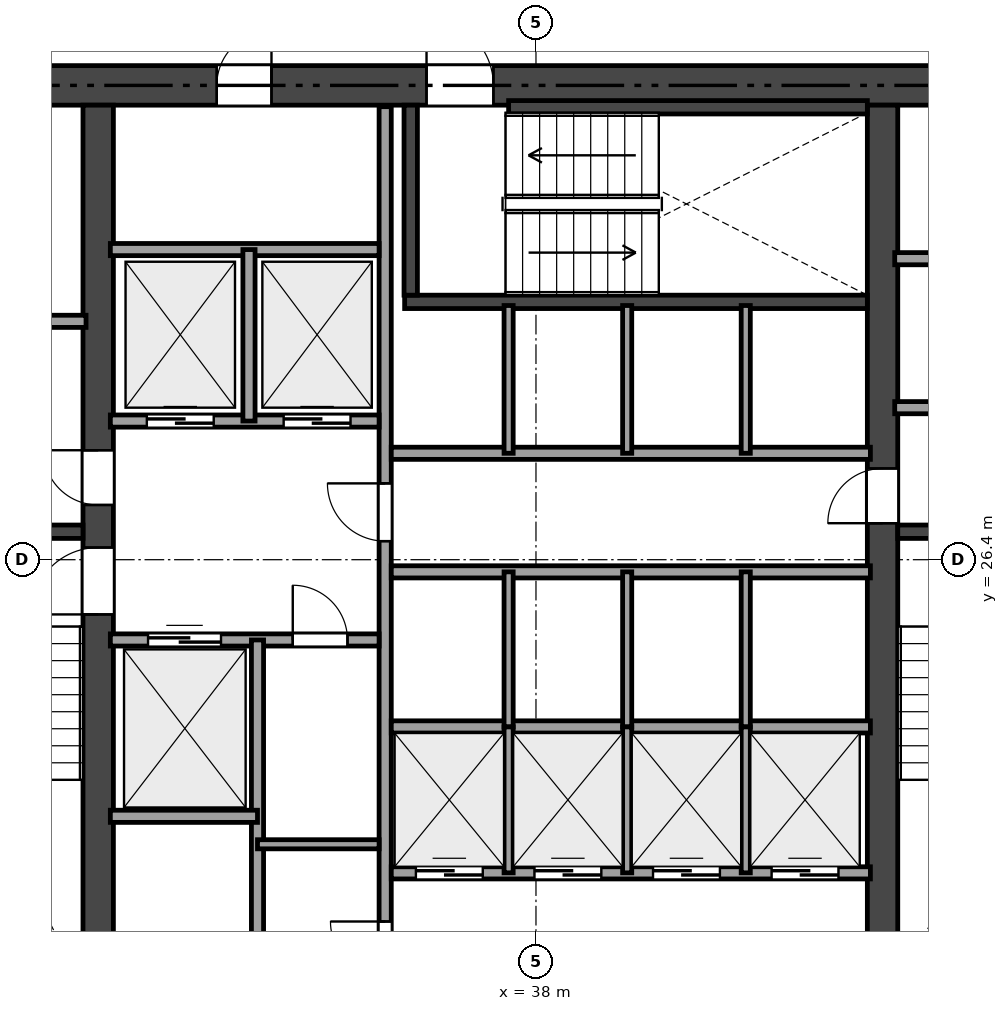
"""IFC4 building model, lengths in metres.
Left out: names, types, materials, properties, quantities, classifications, styles, units other than length and angle.
Written with IfcOpenShell. Run it as: python <this file> out.ifc"""

import sys

from ifc_helpers import new_model, si_unit, direction, frame, frame_2d, origin, place, context, subcontext, project, spatial, rectangle, extrude, element, fill, save


model = new_model("IFC4")
c1 = context("Model", 3, precision=1e-05, world=origin(), true_north=direction((0.0, 1.0)))
c2 = subcontext(c1, "Body", "Model", "MODEL_VIEW")
j1 = project(units=[si_unit("LENGTHUNIT", "METRE"), si_unit("PLANEANGLEUNIT", "RADIAN")], contexts=[c1])
p1 = place(None, origin())
s1 = spatial("IfcSite", under=j1, at=p1, CompositionType="ELEMENT")
p2 = place(p1, origin())
s2 = spatial("IfcBuilding", under=s1, at=p2, CompositionType="ELEMENT")
p3 = place(p2, frame((0.0, 0.0, 37.35)))
s3 = spatial("IfcBuildingStorey", under=s2, at=p3, CompositionType="ELEMENT", Elevation=37.35)
p4 = place(p3, frame((26.475, 34.2, 0.0), z_axis=(0.0, 0.0, 1.0), x_axis=(1.0, 0.0, 0.0)))
e1 = element("IfcWall", 1, at=p4, inside=s3, PredefinedType="SHEAR", context=c2, shape_type="SweptSolid", body=[
    extrude(rectangle(XDim=21.45, YDim=0.65, at=frame_2d((10.725, 0.0))), origin(), (0.0, 0.0, 1.0), 3.17),
])
p5 = place(p4, frame((9.725, 0.0, 0.0)))
e2 = element("IfcOpeningElement", 2, at=p5, cuts=e1, PredefinedType="OPENING", context=c2, shape_type="SweptSolid", body=[
    extrude(rectangle(XDim=1.1, YDim=2.15, at=frame_2d((0.55, 1.075))), frame((0.0, 0.335, 0.0), z_axis=(0.0, -1.0, 0.0), x_axis=(1.0, 0.0, 0.0)), (0.0, 0.0, 1.0), 0.67),
])
p6 = place(p4, frame((1.975, 0.0, 0.0)))
e3 = element("IfcOpeningElement", 3, at=p6, cuts=e1, PredefinedType="OPENING", context=c2, shape_type="SweptSolid", body=[
    extrude(rectangle(XDim=0.9, YDim=2.1, at=frame_2d((0.45, 1.05))), frame((0.0, 0.335, 0.0), z_axis=(0.0, -1.0, 0.0), x_axis=(1.0, 0.0, 0.0)), (0.0, 0.0, 1.0), 0.67),
])
p7 = place(p4, frame((6.275, 0.0, 0.0)))
e4 = element("IfcOpeningElement", 4, at=p7, cuts=e1, PredefinedType="OPENING", context=c2, shape_type="SweptSolid", body=[
    extrude(rectangle(XDim=0.9, YDim=2.1, at=frame_2d((0.45, 1.05))), frame((0.0, 0.335, 0.0), z_axis=(0.0, -1.0, 0.0), x_axis=(1.0, 0.0, 0.0)), (0.0, 0.0, 1.0), 0.67),
])
p8 = place(p3, frame((30.8, 18.925, 0.0), z_axis=(0.0, 0.0, 1.0), x_axis=(0.0, 1.0, 0.0)))
e5 = element("IfcWall", 5, at=p8, inside=s3, PredefinedType="SHEAR", context=c2, shape_type="SweptSolid", body=[
    extrude(rectangle(XDim=14.95, YDim=0.5, at=frame_2d((7.475, 0.0))), origin(), (0.0, 0.0, 1.0), 3.17),
])
p9 = place(p8, frame((6.575, 0.0, 0.0)))
e6 = element("IfcOpeningElement", 6, at=p9, cuts=e5, PredefinedType="OPENING", context=c2, shape_type="SweptSolid", body=[
    extrude(rectangle(XDim=1.1, YDim=2.15, at=frame_2d((0.55, 1.075))), frame((0.0, 0.26, 0.0), z_axis=(0.0, -1.0, 0.0), x_axis=(1.0, 0.0, 0.0)), (0.0, 0.0, 1.0), 0.52),
])
p10 = place(p8, frame((8.375, 0.0, 0.0)))
e7 = element("IfcOpeningElement", 7, at=p10, cuts=e5, PredefinedType="OPENING", context=c2, shape_type="SweptSolid", body=[
    extrude(rectangle(XDim=0.9, YDim=2.1, at=frame_2d((0.45, 1.05))), frame((0.0, 0.26, 0.0), z_axis=(0.0, -1.0, 0.0), x_axis=(1.0, 0.0, 0.0)), (0.0, 0.0, 1.0), 0.52),
])
p11 = place(p3, frame((43.7, 18.925, 0.0), z_axis=(0.0, 0.0, 1.0), x_axis=(0.0, 1.0, 0.0)))
e8 = element("IfcWall", 8, at=p11, inside=s3, PredefinedType="SHEAR", context=c2, shape_type="SweptSolid", body=[
    extrude(rectangle(XDim=14.95, YDim=0.5, at=frame_2d((7.475, 0.0))), origin(), (0.0, 0.0, 1.0), 3.17),
])
p12 = place(p11, frame((8.075, 0.0, 0.0)))
e9 = element("IfcOpeningElement", 9, at=p12, cuts=e8, PredefinedType="OPENING", context=c2, shape_type="SweptSolid", body=[
    extrude(rectangle(XDim=0.9, YDim=2.1, at=frame_2d((0.45, 1.05))), frame((0.0, 0.26, 0.0), z_axis=(0.0, -1.0, 0.0), x_axis=(1.0, 0.0, 0.0)), (0.0, 0.0, 1.0), 0.52),
])
p13 = place(p3, frame((27.125, 26.86, 0.0), z_axis=(0.0, 0.0, 1.0), x_axis=(1.0, 0.0, 0.0)))
e10 = element("IfcWall", 10, at=p13, inside=s3, PredefinedType="SHEAR", context=c2, shape_type="SweptSolid", body=[
    extrude(rectangle(XDim=3.425, YDim=0.22, at=frame_2d((1.712, 0.0))), origin(), (0.0, 0.0, 1.0), 3.17),
])
p14 = place(p3, frame((43.95, 26.86, 0.0), z_axis=(0.0, 0.0, 1.0), x_axis=(1.0, 0.0, 0.0)))
e11 = element("IfcWall", 11, at=p14, inside=s3, PredefinedType="SHEAR", context=c2, shape_type="SweptSolid", body=[
    extrude(rectangle(XDim=3.325, YDim=0.22, at=frame_2d((1.663, 0.0))), origin(), (0.0, 0.0, 1.0), 3.17),
])
p15 = place(p3, frame((35.84, 30.64, 0.0), z_axis=(0.0, 0.0, 1.0), x_axis=(1.0, 0.0, 0.0)))
e12 = element("IfcWall", 12, at=p15, inside=s3, PredefinedType="SHEAR", context=c2, shape_type="SweptSolid", body=[
    extrude(rectangle(XDim=7.61, YDim=0.22, at=frame_2d((3.805, 0.0))), origin(), (0.0, 0.0, 1.0), 3.17),
])
p16 = place(p3, frame((35.94, 30.75, 0.0), z_axis=(0.0, 0.0, 1.0), x_axis=(0.0, 1.0, 0.0)))
e13 = element("IfcWall", 13, at=p16, inside=s3, PredefinedType="SHEAR", context=c2, shape_type="SweptSolid", body=[
    extrude(rectangle(XDim=3.125, YDim=0.22, at=frame_2d((1.562, 0.0))), origin(), (0.0, 0.0, 1.0), 3.17),
])
p17 = place(p3, frame((37.55, 33.84, 0.0), z_axis=(0.0, 0.0, 1.0), x_axis=(1.0, 0.0, 0.0)))
e14 = element("IfcWall", 14, at=p17, inside=s3, PredefinedType="SHEAR", context=c2, shape_type="SweptSolid", body=[
    extrude(rectangle(XDim=5.9, YDim=0.22, at=frame_2d((2.95, 0.0))), origin(), (0.0, 0.0, 1.0), 3.17),
])
p18 = place(p3, frame((27.15, 30.32, 0.0), z_axis=(0.0, 0.0, 1.0), x_axis=(1.0, 0.0, 0.0)))
e15 = element("IfcWall", 15, at=p18, inside=s3, PredefinedType="SOLIDWALL", context=c2, shape_type="SweptSolid", body=[
    extrude(rectangle(XDim=3.45, YDim=0.2, at=frame_2d((1.725, 0.0))), origin(), (0.0, 0.0, 1.0), 3.17),
])
p19 = place(p3, frame((43.9, 28.9, 0.0), z_axis=(0.0, 0.0, 1.0), x_axis=(1.0, 0.0, 0.0)))
e16 = element("IfcWall", 16, at=p19, inside=s3, PredefinedType="SOLIDWALL", context=c2, shape_type="SweptSolid", body=[
    extrude(rectangle(XDim=3.35, YDim=0.2, at=frame_2d((1.675, 0.0))), origin(), (0.0, 0.0, 1.0), 3.17),
])
p20 = place(p19, frame((1.15, 0.0, 0.0)))
e17 = element("IfcOpeningElement", 17, at=p20, cuts=e16, PredefinedType="OPENING", context=c2, shape_type="SweptSolid", body=[
    extrude(rectangle(XDim=0.9, YDim=2.1, at=frame_2d((0.45, 1.05))), frame((0.0, 0.11, 0.0), z_axis=(0.0, -1.0, 0.0), x_axis=(1.0, 0.0, 0.0)), (0.0, 0.0, 1.0), 0.22),
])
p21 = place(p3, frame((43.9, 31.35, 0.0), z_axis=(0.0, 0.0, 1.0), x_axis=(1.0, 0.0, 0.0)))
e18 = element("IfcWall", 18, at=p21, inside=s3, PredefinedType="SOLIDWALL", context=c2, shape_type="SweptSolid", body=[
    extrude(rectangle(XDim=3.35, YDim=0.2, at=frame_2d((1.675, 0.0))), origin(), (0.0, 0.0, 1.0), 3.17),
])
p22 = place(p3, frame((35.52, 18.95, 0.0), z_axis=(0.0, 0.0, 1.0), x_axis=(0.0, 1.0, 0.0)))
e19 = element("IfcWall", 19, at=p22, inside=s3, PredefinedType="SOLIDWALL", context=c2, shape_type="SweptSolid", body=[
    extrude(rectangle(XDim=14.9, YDim=0.2, at=frame_2d((7.45, 0.0))), origin(), (0.0, 0.0, 1.0), 2.691),
])
p23 = place(p22, frame((7.755, 0.0, 0.0)))
e20 = element("IfcOpeningElement", 20, at=p23, cuts=e19, PredefinedType="OPENING", context=c2, shape_type="SweptSolid", body=[
    extrude(rectangle(XDim=0.95, YDim=2.15, at=frame_2d((0.475, 1.075))), frame((0.0, 0.11, 0.0), z_axis=(0.0, -1.0, 0.0), x_axis=(1.0, 0.0, 0.0)), (0.0, 0.0, 1.0), 0.22),
])
p24 = place(p22, frame((0.6, 0.0, 0.0)))
e21 = element("IfcOpeningElement", 21, at=p24, cuts=e19, PredefinedType="OPENING", context=c2, shape_type="SweptSolid", body=[
    extrude(rectangle(XDim=0.9, YDim=2.1, at=frame_2d((0.45, 1.05))), frame((0.0, 0.11, 0.0), z_axis=(0.0, -1.0, 0.0), x_axis=(1.0, 0.0, 0.0)), (0.0, 0.0, 1.0), 0.22),
])
p25 = place(p3, frame((31.0, 28.68, 0.0), z_axis=(0.0, 0.0, 1.0), x_axis=(1.0, 0.0, 0.0)))
e22 = element("IfcWall", 22, at=p25, inside=s3, PredefinedType="SOLIDWALL", context=c2, shape_type="SweptSolid", body=[
    extrude(rectangle(XDim=4.42, YDim=0.2, at=frame_2d((2.21, 0.0))), origin(), (0.0, 0.0, 1.0), 3.17),
])
p26 = place(p25, frame((0.6, 0.0, 0.0)))
e23 = element("IfcOpeningElement", 23, at=p26, cuts=e22, PredefinedType="OPENING", context=c2, shape_type="SweptSolid", body=[
    extrude(rectangle(XDim=1.1, YDim=2.15, at=frame_2d((0.55, 1.075))), frame((0.0, 0.11, 0.0), z_axis=(0.0, -1.0, 0.0), x_axis=(1.0, 0.0, 0.0)), (0.0, 0.0, 1.0), 0.22),
])
p27 = place(p25, frame((2.85, 0.0, 0.0)))
e24 = element("IfcOpeningElement", 24, at=p27, cuts=e22, PredefinedType="OPENING", context=c2, shape_type="SweptSolid", body=[
    extrude(rectangle(XDim=1.1, YDim=2.15, at=frame_2d((0.55, 1.075))), frame((0.0, 0.11, 0.0), z_axis=(0.0, -1.0, 0.0), x_axis=(1.0, 0.0, 0.0)), (0.0, 0.0, 1.0), 0.22),
])
p28 = place(p3, frame((31.0, 31.5, 0.0), z_axis=(0.0, 0.0, 1.0), x_axis=(1.0, 0.0, 0.0)))
e25 = element("IfcWall", 25, at=p28, inside=s3, PredefinedType="SOLIDWALL", context=c2, shape_type="SweptSolid", body=[
    extrude(rectangle(XDim=4.42, YDim=0.2, at=frame_2d((2.21, 0.0))), origin(), (0.0, 0.0, 1.0), 3.17),
])
p29 = place(p3, frame((33.28, 28.68, 0.0), z_axis=(0.0, 0.0, 1.0), x_axis=(0.0, 1.0, 0.0)))
e26 = element("IfcWall", 26, at=p29, inside=s3, PredefinedType="SOLIDWALL", context=c2, shape_type="SweptSolid", body=[
    extrude(rectangle(XDim=2.82, YDim=0.2, at=frame_2d((1.41, 0.0))), origin(), (0.0, 0.0, 1.0), 3.17),
])
p30 = place(p3, frame((31.0, 25.08, 0.0), z_axis=(0.0, 0.0, 1.0), x_axis=(1.0, 0.0, 0.0)))
e27 = element("IfcWall", 27, at=p30, inside=s3, PredefinedType="SOLIDWALL", context=c2, shape_type="SweptSolid", body=[
    extrude(rectangle(XDim=4.42, YDim=0.2, at=frame_2d((2.21, 0.0))), origin(), (0.0, 0.0, 1.0), 3.17),
])
p31 = place(p30, frame((3.0, 0.0, 0.0)))
e28 = element("IfcOpeningElement", 28, at=p31, cuts=e27, PredefinedType="OPENING", context=c2, shape_type="SweptSolid", body=[
    extrude(rectangle(XDim=0.9, YDim=2.1, at=frame_2d((0.45, 1.05))), frame((0.0, 0.11, 0.0), z_axis=(0.0, -1.0, 0.0), x_axis=(1.0, 0.0, 0.0)), (0.0, 0.0, 1.0), 0.22),
])
p32 = place(p30, frame((0.62, 0.0, 0.0)))
e29 = element("IfcOpeningElement", 29, at=p32, cuts=e27, PredefinedType="OPENING", context=c2, shape_type="SweptSolid", body=[
    extrude(rectangle(XDim=1.2, YDim=2.15, at=frame_2d((0.6, 1.075))), frame((0.0, 0.11, 0.0), z_axis=(0.0, -1.0, 0.0), x_axis=(1.0, 0.0, 0.0)), (0.0, 0.0, 1.0), 0.22),
])
p33 = place(p3, frame((33.42, 18.95, 0.0), z_axis=(0.0, 0.0, 1.0), x_axis=(0.0, 1.0, 0.0)))
e30 = element("IfcWall", 30, at=p33, inside=s3, PredefinedType="SOLIDWALL", context=c2, shape_type="SweptSolid", body=[
    extrude(rectangle(XDim=6.13, YDim=0.2, at=frame_2d((3.065, 0.0))), origin(), (0.0, 0.0, 1.0), 2.691),
])
p34 = place(p3, frame((31.0, 22.18, 0.0), z_axis=(0.0, 0.0, 1.0), x_axis=(1.0, 0.0, 0.0)))
e31 = element("IfcWall", 31, at=p34, inside=s3, PredefinedType="SOLIDWALL", context=c2, shape_type="SweptSolid", body=[
    extrude(rectangle(XDim=2.42, YDim=0.2, at=frame_2d((1.21, 0.0))), origin(), (0.0, 0.0, 1.0), 3.17),
])
p35 = place(p3, frame((33.42, 21.72, 0.0), z_axis=(0.0, 0.0, 1.0), x_axis=(1.0, 0.0, 0.0)))
e32 = element("IfcWall", 32, at=p35, inside=s3, PredefinedType="PARTITIONING", context=c2, shape_type="SweptSolid", body=[
    extrude(rectangle(XDim=2.0, YDim=0.15, at=frame_2d((1.0, 0.0))), origin(), (0.0, 0.0, 1.0), 3.17),
])
for number, where, z_axis, x_axis in (
    (33, (35.62, 28.15, 0.0), (0.0, 0.0, 1.0), (1.0, 0.0, 0.0)),
    (34, (35.62, 26.2, 0.0), (0.0, 0.0, 1.0), (1.0, 0.0, 0.0)),
):
    element("IfcWall", number, at=place(p3, frame(where, z_axis=z_axis, x_axis=x_axis)), inside=s3, PredefinedType="SOLIDWALL", context=c2, shape_type="SweptSolid", body=[
        extrude(rectangle(XDim=7.88, YDim=0.2, at=frame_2d((3.94, 0.0))), origin(), (0.0, 0.0, 1.0), 3.17),
    ])
p36 = place(p3, frame((35.62, 23.65, 0.0), z_axis=(0.0, 0.0, 1.0), x_axis=(1.0, 0.0, 0.0)))
e35 = element("IfcWall", 35, at=p36, inside=s3, PredefinedType="SOLIDWALL", context=c2, shape_type="SweptSolid", body=[
    extrude(rectangle(XDim=7.88, YDim=0.2, at=frame_2d((3.94, 0.0))), origin(), (0.0, 0.0, 1.0), 2.691),
])
p37 = place(p3, frame((35.62, 21.25, 0.0), z_axis=(0.0, 0.0, 1.0), x_axis=(1.0, 0.0, 0.0)))
e36 = element("IfcWall", 36, at=p37, inside=s3, PredefinedType="SOLIDWALL", context=c2, shape_type="SweptSolid", body=[
    extrude(rectangle(XDim=7.88, YDim=0.2, at=frame_2d((3.94, 0.0))), origin(), (0.0, 0.0, 1.0), 3.17),
])
p38 = place(p37, frame((0.405, 0.0, 0.0)))
e37 = element("IfcOpeningElement", 37, at=p38, cuts=e36, PredefinedType="OPENING", context=c2, shape_type="SweptSolid", body=[
    extrude(rectangle(XDim=1.1, YDim=2.15, at=frame_2d((0.55, 1.075))), frame((0.0, 0.11, 0.0), z_axis=(0.0, -1.0, 0.0), x_axis=(1.0, 0.0, 0.0)), (0.0, 0.0, 1.0), 0.22),
])
p39 = place(p37, frame((2.355, 0.0, 0.0)))
e38 = element("IfcOpeningElement", 38, at=p39, cuts=e36, PredefinedType="OPENING", context=c2, shape_type="SweptSolid", body=[
    extrude(rectangle(XDim=1.1, YDim=2.15, at=frame_2d((0.55, 1.075))), frame((0.0, 0.11, 0.0), z_axis=(0.0, -1.0, 0.0), x_axis=(1.0, 0.0, 0.0)), (0.0, 0.0, 1.0), 0.22),
])
p40 = place(p37, frame((4.305, 0.0, 0.0)))
e39 = element("IfcOpeningElement", 39, at=p40, cuts=e36, PredefinedType="OPENING", context=c2, shape_type="SweptSolid", body=[
    extrude(rectangle(XDim=1.1, YDim=2.15, at=frame_2d((0.55, 1.075))), frame((0.0, 0.11, 0.0), z_axis=(0.0, -1.0, 0.0), x_axis=(1.0, 0.0, 0.0)), (0.0, 0.0, 1.0), 0.22),
])
p41 = place(p37, frame((6.255, 0.0, 0.0)))
e40 = element("IfcOpeningElement", 40, at=p41, cuts=e36, PredefinedType="OPENING", context=c2, shape_type="SweptSolid", body=[
    extrude(rectangle(XDim=1.1, YDim=2.15, at=frame_2d((0.55, 1.075))), frame((0.0, 0.11, 0.0), z_axis=(0.0, -1.0, 0.0), x_axis=(1.0, 0.0, 0.0)), (0.0, 0.0, 1.0), 0.22),
])
for number, where, z_axis, x_axis in (
    (41, (37.55, 28.15, 0.0), (0.0, 0.0, 1.0), (0.0, 1.0, 0.0)),
    (42, (39.5, 28.15, 0.0), (0.0, 0.0, 1.0), (0.0, 1.0, 0.0)),
    (43, (41.45, 28.15, 0.0), (0.0, 0.0, 1.0), (0.0, 1.0, 0.0)),
):
    element("IfcWall", number, at=place(p3, frame(where, z_axis=z_axis, x_axis=x_axis)), inside=s3, PredefinedType="PARTITIONING", context=c2, shape_type="SweptSolid", body=[
        extrude(rectangle(XDim=2.43, YDim=0.15, at=frame_2d((1.215, 0.0))), origin(), (0.0, 0.0, 1.0), 3.17),
    ])
for number, where, z_axis, x_axis in (
    (44, (37.55, 23.65, 0.0), (0.0, 0.0, 1.0), (0.0, 1.0, 0.0)),
    (45, (39.5, 23.65, 0.0), (0.0, 0.0, 1.0), (0.0, 1.0, 0.0)),
    (46, (41.45, 23.65, 0.0), (0.0, 0.0, 1.0), (0.0, 1.0, 0.0)),
):
    element("IfcWall", number, at=place(p3, frame(where, z_axis=z_axis, x_axis=x_axis)), inside=s3, PredefinedType="PARTITIONING", context=c2, shape_type="SweptSolid", body=[
        extrude(rectangle(XDim=2.55, YDim=0.15, at=frame_2d((1.275, 0.0))), origin(), (0.0, 0.0, 1.0), 2.691),
    ])
for number, where, z_axis, x_axis in (
    (47, (37.55, 21.25, 0.0), (0.0, 0.0, 1.0), (0.0, 1.0, 0.0)),
    (48, (39.5, 21.25, 0.0), (0.0, 0.0, 1.0), (0.0, 1.0, 0.0)),
    (49, (41.45, 21.25, 0.0), (0.0, 0.0, 1.0), (0.0, 1.0, 0.0)),
):
    element("IfcWall", number, at=place(p3, frame(where, z_axis=z_axis, x_axis=x_axis)), inside=s3, PredefinedType="PARTITIONING", context=c2, shape_type="SweptSolid", body=[
        extrude(rectangle(XDim=2.4, YDim=0.15, at=frame_2d((1.2, 0.0))), origin(), (0.0, 0.0, 1.0), 2.691),
    ])
p42 = place(p9, origin())
e50 = element("IfcDoor", 50, at=p42, inside=s3, OperationType="SINGLE_SWING_LEFT", PredefinedType="DOOR", context=c2, shape_type="SweptSolid", body=[
    extrude(rectangle(XDim=1.1, YDim=2.15, at=frame_2d((0.55, 1.075))), frame((0.0, 0.025, 0.0), z_axis=(0.0, -1.0, 0.0), x_axis=(1.0, 0.0, 0.0)), (0.0, 0.0, 1.0), 0.05),
])
fill(e6, e50)
p43 = place(p5, origin())
e51 = element("IfcDoor", 51, at=p43, inside=s3, OperationType="SINGLE_SWING_LEFT", PredefinedType="DOOR", context=c2, shape_type="SweptSolid", body=[
    extrude(rectangle(XDim=1.1, YDim=2.15, at=frame_2d((0.55, 1.075))), frame((0.0, 0.025, 0.0), z_axis=(0.0, -1.0, 0.0), x_axis=(1.0, 0.0, 0.0)), (0.0, 0.0, 1.0), 0.05),
])
fill(e2, e51)
p44 = place(p23, origin())
e52 = element("IfcDoor", 52, at=p44, inside=s3, OperationType="SINGLE_SWING_RIGHT", PredefinedType="DOOR", context=c2, shape_type="SweptSolid", body=[
    extrude(rectangle(XDim=0.95, YDim=2.15, at=frame_2d((0.475, 1.075))), frame((0.0, 0.025, 0.0), z_axis=(0.0, -1.0, 0.0), x_axis=(1.0, 0.0, 0.0)), (0.0, 0.0, 1.0), 0.05),
])
fill(e20, e52)
p45 = place(p12, origin())
e53 = element("IfcDoor", 53, at=p45, inside=s3, OperationType="SINGLE_SWING_LEFT", PredefinedType="DOOR", context=c2, shape_type="SweptSolid", body=[
    extrude(rectangle(XDim=0.9, YDim=2.1, at=frame_2d((0.45, 1.05))), frame((0.0, 0.025, 0.0), z_axis=(0.0, -1.0, 0.0), x_axis=(1.0, 0.0, 0.0)), (0.0, 0.0, 1.0), 0.05),
])
fill(e9, e53)
p46 = place(p10, origin())
e54 = element("IfcDoor", 54, at=p46, inside=s3, OperationType="SINGLE_SWING_RIGHT", PredefinedType="DOOR", context=c2, shape_type="SweptSolid", body=[
    extrude(rectangle(XDim=0.9, YDim=2.1, at=frame_2d((0.45, 1.05))), frame((0.0, 0.025, 0.0), z_axis=(0.0, -1.0, 0.0), x_axis=(1.0, 0.0, 0.0)), (0.0, 0.0, 1.0), 0.05),
])
fill(e7, e54)
p47 = place(p7, origin())
e55 = element("IfcDoor", 55, at=p47, inside=s3, OperationType="SINGLE_SWING_RIGHT", PredefinedType="DOOR", context=c2, shape_type="SweptSolid", body=[
    extrude(rectangle(XDim=0.9, YDim=2.1, at=frame_2d((0.45, 1.05))), frame((0.0, 0.025, 0.0), z_axis=(0.0, -1.0, 0.0), x_axis=(1.0, 0.0, 0.0)), (0.0, 0.0, 1.0), 0.05),
])
fill(e4, e55)
p48 = place(p24, origin())
e56 = element("IfcDoor", 56, at=p48, inside=s3, OperationType="SINGLE_SWING_RIGHT", PredefinedType="DOOR", context=c2, shape_type="SweptSolid", body=[
    extrude(rectangle(XDim=0.9, YDim=2.1, at=frame_2d((0.45, 1.05))), frame((0.0, 0.025, 0.0), z_axis=(0.0, -1.0, 0.0), x_axis=(1.0, 0.0, 0.0)), (0.0, 0.0, 1.0), 0.05),
])
fill(e21, e56)
p49 = place(p31, origin())
e57 = element("IfcDoor", 57, at=p49, inside=s3, OperationType="SINGLE_SWING_LEFT", PredefinedType="DOOR", context=c2, shape_type="SweptSolid", body=[
    extrude(rectangle(XDim=0.9, YDim=2.1, at=frame_2d((0.45, 1.05))), frame((0.0, 0.025, 0.0), z_axis=(0.0, -1.0, 0.0), x_axis=(1.0, 0.0, 0.0)), (0.0, 0.0, 1.0), 0.05),
])
fill(e28, e57)
p50 = place(p26, origin())
e58 = element("IfcDoor", 58, at=p50, inside=s3, OperationType="SLIDING_TO_LEFT", PredefinedType="DOOR", context=c2, shape_type="SweptSolid", body=[
    extrude(rectangle(XDim=1.1, YDim=2.15, at=frame_2d((0.55, 1.075))), frame((0.0, 0.025, 0.0), z_axis=(0.0, -1.0, 0.0), x_axis=(1.0, 0.0, 0.0)), (0.0, 0.0, 1.0), 0.05),
])
fill(e23, e58)
p51 = place(p27, origin())
e59 = element("IfcDoor", 59, at=p51, inside=s3, OperationType="SLIDING_TO_LEFT", PredefinedType="DOOR", context=c2, shape_type="SweptSolid", body=[
    extrude(rectangle(XDim=1.1, YDim=2.15, at=frame_2d((0.55, 1.075))), frame((0.0, 0.025, 0.0), z_axis=(0.0, -1.0, 0.0), x_axis=(1.0, 0.0, 0.0)), (0.0, 0.0, 1.0), 0.05),
])
fill(e24, e59)
p52 = place(p32, origin())
e60 = element("IfcDoor", 60, at=p52, inside=s3, OperationType="SLIDING_TO_LEFT", PredefinedType="DOOR", context=c2, shape_type="SweptSolid", body=[
    extrude(rectangle(XDim=1.2, YDim=2.15, at=frame_2d((0.6, 1.075))), frame((0.0, 0.025, 0.0), z_axis=(0.0, -1.0, 0.0), x_axis=(1.0, 0.0, 0.0)), (0.0, 0.0, 1.0), 0.05),
])
fill(e29, e60)
p53 = place(p38, origin())
e61 = element("IfcDoor", 61, at=p53, inside=s3, OperationType="SLIDING_TO_LEFT", PredefinedType="DOOR", context=c2, shape_type="SweptSolid", body=[
    extrude(rectangle(XDim=1.1, YDim=2.15, at=frame_2d((0.55, 1.075))), frame((0.0, 0.025, 0.0), z_axis=(0.0, -1.0, 0.0), x_axis=(1.0, 0.0, 0.0)), (0.0, 0.0, 1.0), 0.05),
])
fill(e37, e61)
p54 = place(p39, origin())
e62 = element("IfcDoor", 62, at=p54, inside=s3, OperationType="SLIDING_TO_LEFT", PredefinedType="DOOR", context=c2, shape_type="SweptSolid", body=[
    extrude(rectangle(XDim=1.1, YDim=2.15, at=frame_2d((0.55, 1.075))), frame((0.0, 0.025, 0.0), z_axis=(0.0, -1.0, 0.0), x_axis=(1.0, 0.0, 0.0)), (0.0, 0.0, 1.0), 0.05),
])
fill(e38, e62)
p55 = place(p40, origin())
e63 = element("IfcDoor", 63, at=p55, inside=s3, OperationType="SLIDING_TO_LEFT", PredefinedType="DOOR", context=c2, shape_type="SweptSolid", body=[
    extrude(rectangle(XDim=1.1, YDim=2.15, at=frame_2d((0.55, 1.075))), frame((0.0, 0.025, 0.0), z_axis=(0.0, -1.0, 0.0), x_axis=(1.0, 0.0, 0.0)), (0.0, 0.0, 1.0), 0.05),
])
fill(e39, e63)
p56 = place(p41, origin())
e64 = element("IfcDoor", 64, at=p56, inside=s3, OperationType="SLIDING_TO_LEFT", PredefinedType="DOOR", context=c2, shape_type="SweptSolid", body=[
    extrude(rectangle(XDim=1.1, YDim=2.15, at=frame_2d((0.55, 1.075))), frame((0.0, 0.025, 0.0), z_axis=(0.0, -1.0, 0.0), x_axis=(1.0, 0.0, 0.0)), (0.0, 0.0, 1.0), 0.05),
])
fill(e40, e64)
save(model, sys.argv[1])
